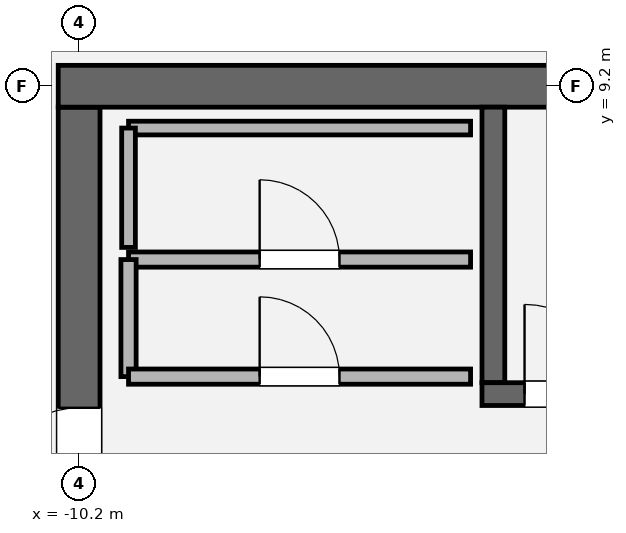
"""IFC4 building model, lengths in metres.
Left out: names, types, materials, properties, quantities, classifications, styles, units other than length and angle.
Written with IfcOpenShell. Run it as: python <this file> out.ifc"""

import sys

from ifc_helpers import new_model, si_unit, direction, frame, frame_2d, origin, place, context, subcontext, project, spatial, rectangle, extrude, element, fill, save


model = new_model("IFC4")
c1 = context("Model", 3, precision=1e-05, world=origin(), true_north=direction((0.0, 1.0)))
c2 = subcontext(c1, "Body", "Model", "MODEL_VIEW")
j1 = project(units=[si_unit("LENGTHUNIT", "METRE"), si_unit("PLANEANGLEUNIT", "RADIAN")], contexts=[c1])
p1 = place(None, origin())
s1 = spatial("IfcSite", under=j1, at=p1, CompositionType="ELEMENT")
p2 = place(p1, origin())
s2 = spatial("IfcBuilding", under=s1, at=p2, CompositionType="ELEMENT")
p3 = place(p2, frame((0.0, 0.0, 267.6)))
s3 = spatial("IfcBuildingStorey", under=s2, at=p3, CompositionType="ELEMENT", Elevation=267.6)
p4 = place(p3, frame((-10.2, -8.925, 0.0), z_axis=(0.0, 0.0, 1.0), x_axis=(0.0, 1.0, 0.0)))
e1 = element("IfcWall", 1, at=p4, inside=s3, PredefinedType="SHEAR", context=c2, shape_type="SweptSolid", body=[
    extrude(rectangle(XDim=17.85, YDim=0.55, at=frame_2d((8.925, 0.0))), origin(), (0.0, 0.0, 1.0), 4.05),
])
p5 = place(p4, frame((12.715, 0.0, 0.0)))
e2 = element("IfcOpeningElement", 2, at=p5, cuts=e1, PredefinedType="OPENING", context=c2, shape_type="SweptSolid", body=[
    extrude(rectangle(XDim=1.18, YDim=2.2, at=frame_2d((0.59, 1.1))), frame((0.0, 0.285, 0.0), z_axis=(0.0, -1.0, 0.0), x_axis=(1.0, 0.0, 0.0)), (0.0, 0.0, 1.0), 0.57),
])
p6 = place(p3, frame((-10.475, 9.2, 0.0), z_axis=(0.0, 0.0, 1.0), x_axis=(1.0, 0.0, 0.0)))
e3 = element("IfcWall", 3, at=p6, inside=s3, PredefinedType="SHEAR", context=c2, shape_type="SweptSolid", body=[
    extrude(rectangle(XDim=20.95, YDim=0.55, at=frame_2d((10.475, 0.0))), origin(), (0.0, 0.0, 1.0), 4.05),
])
p7 = place(p3, frame((-4.75, 5.3, 0.0), z_axis=(0.0, 0.0, 1.0), x_axis=(0.0, 1.0, 0.0)))
e4 = element("IfcWall", 4, at=p7, inside=s3, PredefinedType="SOLIDWALL", context=c2, shape_type="SweptSolid", body=[
    extrude(rectangle(XDim=3.625, YDim=0.3, at=frame_2d((1.812, 0.0))), origin(), (0.0, 0.0, 1.0), 4.05),
])
p8 = place(p3, frame((-4.9, 5.15, 0.0), z_axis=(0.0, 0.0, 1.0), x_axis=(1.0, 0.0, 0.0)))
e5 = element("IfcWall", 5, at=p8, inside=s3, PredefinedType="SOLIDWALL", context=c2, shape_type="SweptSolid", body=[
    extrude(rectangle(XDim=9.8, YDim=0.3, at=frame_2d((4.9, 0.0))), origin(), (0.0, 0.0, 1.0), 4.05),
])
p9 = place(p8, frame((0.56, 0.0, 0.0)))
e6 = element("IfcOpeningElement", 6, at=p9, cuts=e5, PredefinedType="OPENING", context=c2, shape_type="SweptSolid", body=[
    extrude(rectangle(XDim=1.18, YDim=2.2, at=frame_2d((0.59, 1.1))), frame((0.0, 0.16, 0.0), z_axis=(0.0, -1.0, 0.0), x_axis=(1.0, 0.0, 0.0)), (0.0, 0.0, 1.0), 0.32),
])
p10 = place(p3, frame((-5.05, 6.92, 0.0), z_axis=(0.0, 0.0, 1.0), x_axis=(-1.0, 0.0, 0.0)))
e7 = element("IfcWall", 7, at=p10, inside=s3, PredefinedType="SOLIDWALL", context=c2, shape_type="SweptSolid", body=[
    extrude(rectangle(XDim=4.5, YDim=0.2, at=frame_2d((2.25, 0.0))), origin(), (0.0, 0.0, 1.0), 3.85),
])
p11 = place(p10, frame((1.725, 0.0, 0.0)))
e8 = element("IfcOpeningElement", 8, at=p11, cuts=e7, PredefinedType="OPENING", context=c2, shape_type="SweptSolid", body=[
    extrude(rectangle(XDim=1.05, YDim=2.2, at=frame_2d((0.525, 1.1))), frame((0.0, 0.11, 0.0), z_axis=(0.0, -1.0, 0.0), x_axis=(1.0, 0.0, 0.0)), (0.0, 0.0, 1.0), 0.22),
])
p12 = place(p3, frame((-9.55, 6.92, 0.0), z_axis=(0.0, 0.0, 1.0), x_axis=(0.0, -1.0, 0.0)))
e9 = element("IfcWall", 9, at=p12, inside=s3, PredefinedType="SOLIDWALL", context=c2, shape_type="SweptSolid", body=[
    extrude(rectangle(XDim=1.54, YDim=0.2, at=frame_2d((0.77, 0.0))), origin(), (0.0, 0.0, 1.0), 3.85),
])
p13 = place(p3, frame((-9.55, 5.38, 0.0), z_axis=(0.0, 0.0, 1.0), x_axis=(1.0, 0.0, 0.0)))
e10 = element("IfcWall", 10, at=p13, inside=s3, PredefinedType="SOLIDWALL", context=c2, shape_type="SweptSolid", body=[
    extrude(rectangle(XDim=4.5, YDim=0.2, at=frame_2d((2.25, 0.0))), origin(), (0.0, 0.0, 1.0), 3.85),
])
p14 = place(p13, frame((1.725, 0.0, 0.0)))
e11 = element("IfcOpeningElement", 11, at=p14, cuts=e10, PredefinedType="OPENING", context=c2, shape_type="SweptSolid", body=[
    extrude(rectangle(XDim=1.05, YDim=2.2, at=frame_2d((0.525, 1.1))), frame((0.0, 0.11, 0.0), z_axis=(0.0, -1.0, 0.0), x_axis=(1.0, 0.0, 0.0)), (0.0, 0.0, 1.0), 0.22),
])
p15 = place(p3, frame((-5.05, 8.65, 0.0), z_axis=(0.0, 0.0, 1.0), x_axis=(-1.0, 0.0, 0.0)))
e12 = element("IfcWall", 12, at=p15, inside=s3, PredefinedType="PARTITIONING", context=c2, shape_type="SweptSolid", body=[
    extrude(rectangle(XDim=4.5, YDim=0.18, at=frame_2d((2.25, 0.0))), origin(), (0.0, 0.0, 1.0), 3.85),
])
p16 = place(p3, frame((-9.55, 8.65, 0.0), z_axis=(0.0, 0.0, 1.0), x_axis=(0.0, -1.0, 0.0)))
e13 = element("IfcWall", 13, at=p16, inside=s3, PredefinedType="PARTITIONING", context=c2, shape_type="SweptSolid", body=[
    extrude(rectangle(XDim=1.57, YDim=0.18, at=frame_2d((0.785, 0.0))), origin(), (0.0, 0.0, 1.0), 3.85),
])
p17 = place(p9, origin())
e14 = element("IfcDoor", 14, at=p17, inside=s3, OperationType="SINGLE_SWING_LEFT", PredefinedType="DOOR", context=c2, shape_type="SweptSolid", body=[
    extrude(rectangle(XDim=1.18, YDim=2.2, at=frame_2d((0.59, 1.1))), frame((0.0, 0.025, 0.0), z_axis=(0.0, -1.0, 0.0), x_axis=(1.0, 0.0, 0.0)), (0.0, 0.0, 1.0), 0.05),
])
fill(e6, e14)
p18 = place(p5, origin())
e15 = element("IfcDoor", 15, at=p18, inside=s3, OperationType="SINGLE_SWING_LEFT", PredefinedType="DOOR", context=c2, shape_type="SweptSolid", body=[
    extrude(rectangle(XDim=1.18, YDim=2.2, at=frame_2d((0.59, 1.1))), frame((0.0, 0.025, 0.0), z_axis=(0.0, -1.0, 0.0), x_axis=(1.0, 0.0, 0.0)), (0.0, 0.0, 1.0), 0.05),
])
fill(e2, e15)
p19 = place(p14, origin())
e16 = element("IfcDoor", 16, at=p19, inside=s3, OperationType="SINGLE_SWING_LEFT", PredefinedType="DOOR", context=c2, shape_type="SweptSolid", body=[
    extrude(rectangle(XDim=1.05, YDim=2.2, at=frame_2d((0.525, 1.1))), frame((0.0, 0.025, 0.0), z_axis=(0.0, -1.0, 0.0), x_axis=(1.0, 0.0, 0.0)), (0.0, 0.0, 1.0), 0.05),
])
fill(e11, e16)
p20 = place(p11, origin())
e17 = element("IfcDoor", 17, at=p20, inside=s3, OperationType="SINGLE_SWING_RIGHT", PredefinedType="DOOR", context=c2, shape_type="SweptSolid", body=[
    extrude(rectangle(XDim=1.05, YDim=2.2, at=frame_2d((0.525, 1.1))), frame((0.0, 0.025, 0.0), z_axis=(0.0, -1.0, 0.0), x_axis=(1.0, 0.0, 0.0)), (0.0, 0.0, 1.0), 0.05),
])
fill(e8, e17)
save(model, sys.argv[1])
